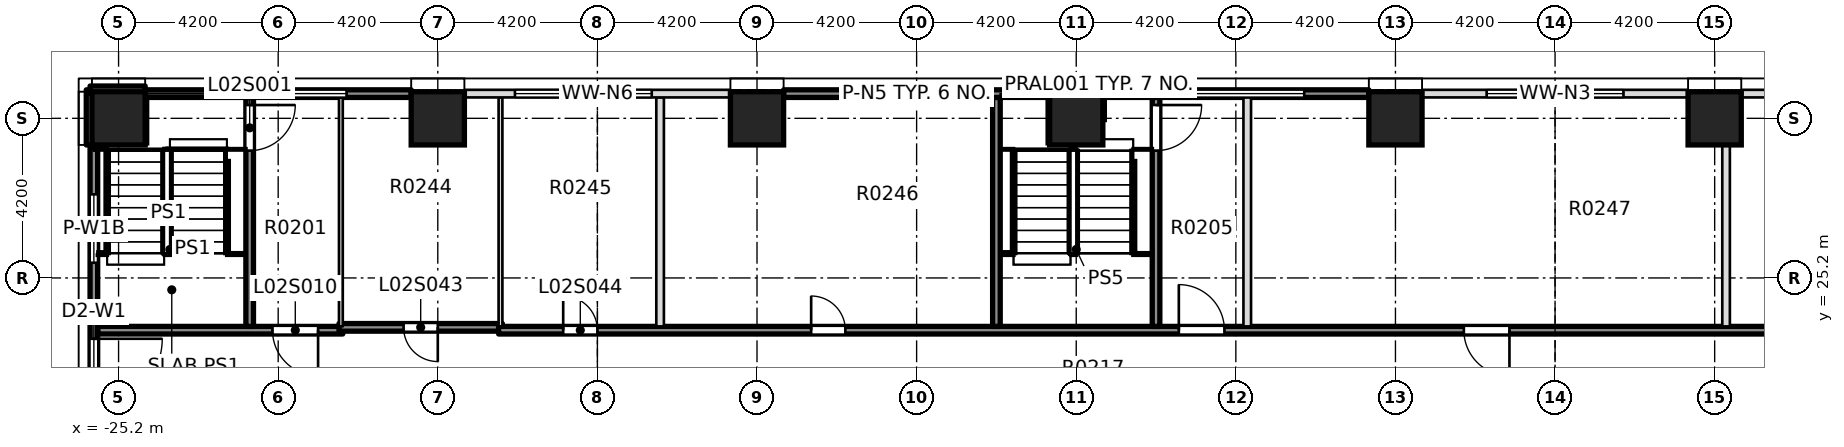
"""IFC4 building model, lengths in metres.
Left out: names, types, materials, properties, quantities, classifications, styles, units other than length and angle.
Written with IfcOpenShell. Run it as: python <this file> out.ifc"""

import sys

from ifc_helpers import new_model, si_unit, direction, frame, frame_2d, origin, origin_2d, place, context, subcontext, project, spatial, rectangle, extrude, element, fill, save


model = new_model("IFC4")
c1 = context("Model", 3, precision=1e-05, world=origin(), true_north=direction((0.0, 1.0)))
c2 = subcontext(c1, "Body", "Model", "MODEL_VIEW")
j1 = project(units=[si_unit("LENGTHUNIT", "METRE"), si_unit("PLANEANGLEUNIT", "RADIAN")], contexts=[c1])
p1 = place(None, origin())
s1 = spatial("IfcSite", under=j1, at=p1, CompositionType="ELEMENT")
p2 = place(p1, origin())
s2 = spatial("IfcBuilding", under=s1, at=p2, CompositionType="ELEMENT")
p3 = place(p2, frame((0.0, 0.0, 12.5)))
s3 = spatial("IfcBuildingStorey", under=s2, at=p3, CompositionType="ELEMENT", Elevation=12.5)
for number, where, z_axis, x_axis in (
    (1, (-25.2, 29.4, 0.0), (0.0, 0.0, 1.0), (1.0, 0.0, 0.0)),
    (2, (-16.8, 29.4, 0.0), (0.0, 0.0, 1.0), (1.0, 0.0, 0.0)),
    (3, (-8.4, 29.4, 0.0), (0.0, 0.0, 1.0), (1.0, 0.0, 0.0)),
    (4, (0.0, 29.4, 0.0), (0.0, 0.0, 1.0), (1.0, 0.0, 0.0)),
    (5, (8.4, 29.4, 0.0), (0.0, 0.0, 1.0), (1.0, 0.0, 0.0)),
    (6, (16.8, 29.4, 0.0), (0.0, 0.0, 1.0), (1.0, 0.0, 0.0)),
):
    element("IfcColumn", number, at=place(p3, frame(where, z_axis=z_axis, x_axis=x_axis)), inside=s3, PredefinedType="COLUMN", context=c2, shape_type="SweptSolid", body=[
        extrude(rectangle(XDim=1.4, YDim=1.4, at=origin_2d()), origin(), (0.0, 0.0, 1.0), 7.5),
    ])
p4 = place(p3, frame((-25.75, 23.825, 0.0), z_axis=(0.0, 0.0, 1.0), x_axis=(1.0, 0.0, 0.0)))
e7 = element("IfcWall", 7, at=p4, inside=s3, PredefinedType="SOLIDWALL", context=c2, shape_type="SweptSolid", body=[
    extrude(rectangle(XDim=6.45, YDim=0.2, at=frame_2d((3.225, 0.0))), origin(), (0.0, 0.0, 1.0), 7.1),
])
p5 = place(p4, frame((4.6, 0.0, 0.0)))
e8 = element("IfcOpeningElement", 8, at=p5, cuts=e7, PredefinedType="OPENING", context=c2, shape_type="SweptSolid", body=[
    extrude(rectangle(XDim=1.2, YDim=2.1, at=frame_2d((0.6, 1.05))), frame((0.0, 0.11, 0.0), z_axis=(0.0, -1.0, 0.0), x_axis=(1.0, 0.0, 0.0)), (0.0, 0.0, 1.0), 0.22),
])
p6 = place(p3, frame((-19.4, 23.9, 0.0), z_axis=(0.0, 0.0, 1.0), x_axis=(1.0, 0.0, 0.0)))
e9 = element("IfcWall", 9, at=p6, inside=s3, PredefinedType="SOLIDWALL", context=c2, shape_type="SweptSolid", body=[
    extrude(rectangle(XDim=4.3, YDim=0.2, at=frame_2d((2.15, 0.0))), origin(), (0.0, 0.0, 1.0), 7.1),
])
p7 = place(p6, frame((1.7, 0.0, 0.0)))
e10 = element("IfcOpeningElement", 10, at=p7, cuts=e9, PredefinedType="OPENING", context=c2, shape_type="SweptSolid", body=[
    extrude(rectangle(XDim=0.9, YDim=2.1, at=frame_2d((0.45, 1.05))), frame((0.0, 0.11, 0.0), z_axis=(0.0, -1.0, 0.0), x_axis=(1.0, 0.0, 0.0)), (0.0, 0.0, 1.0), 0.22),
])
p8 = place(p3, frame((-15.2, 23.825, 0.0), z_axis=(0.0, 0.0, 1.0), x_axis=(1.0, 0.0, 0.0)))
e11 = element("IfcWall", 11, at=p8, inside=s3, PredefinedType="SOLIDWALL", context=c2, shape_type="SweptSolid", body=[
    extrude(rectangle(XDim=51.45, YDim=0.2, at=frame_2d((25.725, 0.0))), origin(), (0.0, 0.0, 1.0), 7.1),
])
p9 = place(p8, frame((17.9, 0.0, 0.0)))
e12 = element("IfcOpeningElement", 12, at=p9, cuts=e11, PredefinedType="OPENING", context=c2, shape_type="SweptSolid", body=[
    extrude(rectangle(XDim=1.2, YDim=2.1, at=frame_2d((0.6, 1.05))), frame((0.0, 0.11, 0.0), z_axis=(0.0, -1.0, 0.0), x_axis=(1.0, 0.0, 0.0)), (0.0, 0.0, 1.0), 0.22),
])
p10 = place(p8, frame((1.7, 0.0, 0.0)))
e13 = element("IfcOpeningElement", 13, at=p10, cuts=e11, PredefinedType="OPENING", context=c2, shape_type="SweptSolid", body=[
    extrude(rectangle(XDim=0.9, YDim=2.1, at=frame_2d((0.45, 1.05))), frame((0.0, 0.11, 0.0), z_axis=(0.0, -1.0, 0.0), x_axis=(1.0, 0.0, 0.0)), (0.0, 0.0, 1.0), 0.22),
])
p11 = place(p8, frame((8.225, 0.0, 0.0)))
e14 = element("IfcOpeningElement", 14, at=p11, cuts=e11, PredefinedType="OPENING", context=c2, shape_type="SweptSolid", body=[
    extrude(rectangle(XDim=0.9, YDim=2.1, at=frame_2d((0.45, 1.05))), frame((0.0, 0.11, 0.0), z_axis=(0.0, -1.0, 0.0), x_axis=(1.0, 0.0, 0.0)), (0.0, 0.0, 1.0), 0.22),
])
p12 = place(p8, frame((25.4, 0.0, 0.0)))
e15 = element("IfcOpeningElement", 15, at=p12, cuts=e11, PredefinedType="OPENING", context=c2, shape_type="SweptSolid", body=[
    extrude(rectangle(XDim=1.2, YDim=2.1, at=frame_2d((0.6, 1.05))), frame((0.0, 0.11, 0.0), z_axis=(0.0, -1.0, 0.0), x_axis=(1.0, 0.0, 0.0)), (0.0, 0.0, 1.0), 0.22),
])
p13 = place(p8, frame((41.375, 0.0, 0.0)))
e16 = element("IfcOpeningElement", 16, at=p13, cuts=e11, PredefinedType="OPENING", context=c2, shape_type="SweptSolid", body=[
    extrude(rectangle(XDim=0.9, YDim=2.1, at=frame_2d((0.45, 1.05))), frame((0.0, 0.11, 0.0), z_axis=(0.0, -1.0, 0.0), x_axis=(1.0, 0.0, 0.0)), (0.0, 0.0, 1.0), 0.22),
])
p14 = place(p3, frame((-21.75, 23.925, 0.0), z_axis=(0.0, 0.0, 1.0), x_axis=(0.0, 1.0, 0.0)))
e17 = element("IfcWall", 17, at=p14, inside=s3, PredefinedType="SOLIDWALL", context=c2, shape_type="SweptSolid", body=[
    extrude(rectangle(XDim=6.025, YDim=0.2, at=frame_2d((3.012, 0.0))), origin(), (0.0, 0.0, 1.0), 7.1),
])
p15 = place(p14, frame((4.625, 0.0, 0.0)))
e18 = element("IfcOpeningElement", 18, at=p15, cuts=e17, PredefinedType="OPENING", context=c2, shape_type="SweptSolid", body=[
    extrude(rectangle(XDim=1.2, YDim=2.1, at=frame_2d((0.6, 1.05))), frame((0.0, 0.11, 0.0), z_axis=(0.0, -1.0, 0.0), x_axis=(1.0, 0.0, 0.0)), (0.0, 0.0, 1.0), 0.22),
])
for number, where, z_axis, x_axis in (
    (19, (-19.35, 23.925, 0.0), (0.0, 0.0, 1.0), (0.0, 1.0, 0.0)),
    (20, (-15.15, 23.925, 0.0), (0.0, 0.0, 1.0), (0.0, 1.0, 0.0)),
):
    element("IfcWall", number, at=place(p3, frame(where, z_axis=z_axis, x_axis=x_axis)), inside=s3, PredefinedType="PARTITIONING", context=c2, shape_type="SweptSolid", body=[
        extrude(rectangle(XDim=6.025, YDim=0.1, at=frame_2d((3.012, 0.0))), origin(), (0.0, 0.0, 1.0), 7.1),
    ])
p16 = place(p3, frame((-10.95, 23.925, 0.0), z_axis=(0.0, 0.0, 1.0), x_axis=(0.0, 1.0, 0.0)))
e21 = element("IfcWall", 21, at=p16, inside=s3, PredefinedType="PARTITIONING", context=c2, shape_type="SweptSolid", body=[
    extrude(rectangle(XDim=6.025, YDim=0.2, at=frame_2d((3.012, 0.0))), origin(), (0.0, 0.0, 1.0), 7.1),
])
p17 = place(p3, frame((-2.1, 23.925, 0.0), z_axis=(0.0, 0.0, 1.0), x_axis=(0.0, 1.0, 0.0)))
e22 = element("IfcWall", 22, at=p17, inside=s3, PredefinedType="SOLIDWALL", context=c2, shape_type="SweptSolid", body=[
    extrude(rectangle(XDim=6.025, YDim=0.2, at=frame_2d((3.012, 0.0))), origin(), (0.0, 0.0, 1.0), 7.1),
])
p18 = place(p3, frame((2.1, 23.925, 0.0), z_axis=(0.0, 0.0, 1.0), x_axis=(0.0, 1.0, 0.0)))
e23 = element("IfcWall", 23, at=p18, inside=s3, PredefinedType="SOLIDWALL", context=c2, shape_type="SweptSolid", body=[
    extrude(rectangle(XDim=6.025, YDim=0.2, at=frame_2d((3.012, 0.0))), origin(), (0.0, 0.0, 1.0), 7.1),
])
p19 = place(p18, frame((4.625, 0.0, 0.0)))
e24 = element("IfcOpeningElement", 24, at=p19, cuts=e23, PredefinedType="OPENING", context=c2, shape_type="SweptSolid", body=[
    extrude(rectangle(XDim=1.2, YDim=2.1, at=frame_2d((0.6, 1.05))), frame((0.0, 0.11, 0.0), z_axis=(0.0, -1.0, 0.0), x_axis=(1.0, 0.0, 0.0)), (0.0, 0.0, 1.0), 0.22),
])
for number, where, z_axis, x_axis in (
    (25, (4.5, 23.925, 0.0), (0.0, 0.0, 1.0), (0.0, 1.0, 0.0)),
    (26, (17.1, 23.925, 0.0), (0.0, 0.0, 1.0), (0.0, 1.0, 0.0)),
):
    element("IfcWall", number, at=place(p3, frame(where, z_axis=z_axis, x_axis=x_axis)), inside=s3, PredefinedType="PARTITIONING", context=c2, shape_type="SweptSolid", body=[
        extrude(rectangle(XDim=6.025, YDim=0.2, at=frame_2d((3.012, 0.0))), origin(), (0.0, 0.0, 1.0), 7.1),
    ])
p20 = place(p3, frame((24.5, 30.05, 0.0), z_axis=(0.0, 0.0, 1.0), x_axis=(-1.0, 0.0, 0.0)))
e27 = element("IfcWall", 27, at=p20, inside=s3, PredefinedType="STANDARD", context=c2, shape_type="SweptSolid", body=[
    extrude(rectangle(XDim=7.0, YDim=0.2, at=frame_2d((3.5, 0.0))), origin(), (0.0, 0.0, 1.0), 7.1),
])
p21 = place(p20, frame((1.7, 0.0, 0.9)))
e28 = element("IfcOpeningElement", 28, at=p21, cuts=e27, PredefinedType="OPENING", context=c2, shape_type="SweptSolid", body=[
    extrude(rectangle(XDim=3.6, YDim=4.2, at=frame_2d((1.8, 2.1))), frame((0.0, 0.11, 0.0), z_axis=(0.0, -1.0, 0.0), x_axis=(1.0, 0.0, 0.0)), (0.0, 0.0, 1.0), 0.22),
])
p22 = place(p3, frame((16.1, 30.05, 0.0), z_axis=(0.0, 0.0, 1.0), x_axis=(-1.0, 0.0, 0.0)))
e29 = element("IfcWall", 29, at=p22, inside=s3, PredefinedType="STANDARD", context=c2, shape_type="SweptSolid", body=[
    extrude(rectangle(XDim=7.0, YDim=0.2, at=frame_2d((3.5, 0.0))), origin(), (0.0, 0.0, 1.0), 7.1),
])
p23 = place(p22, frame((1.7, 0.0, 0.9)))
e30 = element("IfcOpeningElement", 30, at=p23, cuts=e29, PredefinedType="OPENING", context=c2, shape_type="SweptSolid", body=[
    extrude(rectangle(XDim=3.6, YDim=4.2, at=frame_2d((1.8, 2.1))), frame((0.0, 0.11, 0.0), z_axis=(0.0, -1.0, 0.0), x_axis=(1.0, 0.0, 0.0)), (0.0, 0.0, 1.0), 0.22),
])
p24 = place(p3, frame((0.7, 30.05, 0.0), z_axis=(0.0, 0.0, 1.0), x_axis=(1.0, 0.0, 0.0)))
e31 = element("IfcWall", 31, at=p24, inside=s3, PredefinedType="SOLIDWALL", context=c2, shape_type="SweptSolid", body=[
    extrude(rectangle(XDim=7.0, YDim=0.2, at=frame_2d((3.5, 0.0))), origin(), (0.0, 0.0, 1.0), 7.1),
])
p25 = place(p24, frame((1.7, 0.0, 0.9)))
e32 = element("IfcOpeningElement", 32, at=p25, cuts=e31, PredefinedType="OPENING", context=c2, shape_type="SweptSolid", body=[
    extrude(rectangle(XDim=3.6, YDim=4.2, at=frame_2d((1.8, 2.1))), frame((0.0, 0.11, 0.0), z_axis=(0.0, -1.0, 0.0), x_axis=(1.0, 0.0, 0.0)), (0.0, 0.0, 1.0), 0.22),
])
p26 = place(p3, frame((-7.7, 30.05, 0.0), z_axis=(0.0, 0.0, 1.0), x_axis=(1.0, 0.0, 0.0)))
e33 = element("IfcWall", 33, at=p26, inside=s3, PredefinedType="SOLIDWALL", context=c2, shape_type="SweptSolid", body=[
    extrude(rectangle(XDim=7.0, YDim=0.2, at=frame_2d((3.5, 0.0))), origin(), (0.0, 0.0, 1.0), 7.1),
])
p27 = place(p26, frame((1.7, 0.0, 0.9)))
e34 = element("IfcOpeningElement", 34, at=p27, cuts=e33, PredefinedType="OPENING", context=c2, shape_type="SweptSolid", body=[
    extrude(rectangle(XDim=3.6, YDim=4.2, at=frame_2d((1.8, 2.1))), frame((0.0, 0.11, 0.0), z_axis=(0.0, -1.0, 0.0), x_axis=(1.0, 0.0, 0.0)), (0.0, 0.0, 1.0), 0.22),
])
p28 = place(p3, frame((-9.1, 30.05, 0.0), z_axis=(0.0, 0.0, 1.0), x_axis=(-1.0, 0.0, 0.0)))
e35 = element("IfcWall", 35, at=p28, inside=s3, PredefinedType="STANDARD", context=c2, shape_type="SweptSolid", body=[
    extrude(rectangle(XDim=7.0, YDim=0.2, at=frame_2d((3.5, 0.0))), origin(), (0.0, 0.0, 1.0), 7.1),
])
p29 = place(p28, frame((2.07, 0.0, 0.9)))
e36 = element("IfcOpeningElement", 36, at=p29, cuts=e35, PredefinedType="OPENING", context=c2, shape_type="SweptSolid", body=[
    extrude(rectangle(XDim=3.6, YDim=4.2, at=frame_2d((1.8, 2.1))), frame((0.0, 0.11, 0.0), z_axis=(0.0, -1.0, 0.0), x_axis=(1.0, 0.0, 0.0)), (0.0, 0.0, 1.0), 0.22),
])
p30 = place(p3, frame((-24.5, 30.05, 0.0), z_axis=(0.0, 0.0, 1.0), x_axis=(1.0, 0.0, 0.0)))
e37 = element("IfcWall", 37, at=p30, inside=s3, PredefinedType="SOLIDWALL", context=c2, shape_type="SweptSolid", body=[
    extrude(rectangle(XDim=7.0, YDim=0.2, at=frame_2d((3.5, 0.0))), origin(), (0.0, 0.0, 1.0), 7.1),
])
p31 = place(p30, frame((1.7, 0.0, 0.9)))
e38 = element("IfcOpeningElement", 38, at=p31, cuts=e37, PredefinedType="OPENING", context=c2, shape_type="SweptSolid", body=[
    extrude(rectangle(XDim=3.6, YDim=4.2, at=frame_2d((1.8, 2.1))), frame((0.0, 0.11, 0.0), z_axis=(0.0, -1.0, 0.0), x_axis=(1.0, 0.0, 0.0)), (0.0, 0.0, 1.0), 0.22),
])
p32 = place(p3, frame((-25.85, 21.7, 0.0), z_axis=(0.0, 0.0, 1.0), x_axis=(0.0, 1.0, 0.0)))
e39 = element("IfcWall", 39, at=p32, inside=s3, PredefinedType="SOLIDWALL", context=c2, shape_type="SweptSolid", body=[
    extrude(rectangle(XDim=7.0, YDim=0.2, at=frame_2d((3.5, 0.0))), origin(), (0.0, 0.0, 1.0), 7.1),
])
p33 = place(p32, frame((0.1, 0.0, 0.0)))
e40 = element("IfcOpeningElement", 40, at=p33, cuts=e39, PredefinedType="OPENING", context=c2, shape_type="SweptSolid", body=[
    extrude(rectangle(XDim=1.8, YDim=2.4, at=frame_2d((0.9, 1.2))), frame((0.0, 0.11, 0.0), z_axis=(0.0, -1.0, 0.0), x_axis=(1.0, 0.0, 0.0)), (0.0, 0.0, 1.0), 0.22),
])
p34 = place(p32, frame((3.9, 0.0, 0.9)))
e41 = element("IfcOpeningElement", 41, at=p34, cuts=e39, PredefinedType="OPENING", context=c2, shape_type="SweptSolid", body=[
    extrude(rectangle(XDim=1.8, YDim=4.2, at=frame_2d((0.9, 2.1))), frame((0.0, 0.11, 0.0), z_axis=(0.0, -1.0, 0.0), x_axis=(1.0, 0.0, 0.0)), (0.0, 0.0, 1.0), 0.22),
])
for number, where, z_axis, x_axis in (
    (42, (-25.95, 28.7, 0.0), (0.0, 0.0, 1.0), (0.0, 1.0, 0.0)),
    (43, (-25.95, 30.15, 0.0), (0.0, 0.0, 1.0), (1.0, 0.0, 0.0)),
):
    element("IfcWall", number, at=place(p3, frame(where, z_axis=z_axis, x_axis=x_axis)), inside=s3, PredefinedType="SOLIDWALL", context=c2, shape_type="SweptSolid", body=[
        extrude(rectangle(XDim=1.45, YDim=0.2, at=frame_2d((0.725, 0.0))), origin(), (0.0, 0.0, 1.0), 7.1),
    ])
p35 = place(p3, frame((-0.7, 30.15, 0.0), z_axis=(0.0, 0.0, 1.0), x_axis=(1.0, 0.0, 0.0)))
e44 = element("IfcWall", 44, at=p35, inside=s3, PredefinedType="SOLIDWALL", context=c2, shape_type="SweptSolid", body=[
    extrude(rectangle(XDim=1.4, YDim=0.2, at=frame_2d((0.7, 0.0))), origin(), (0.0, 0.0, 1.0), 7.1),
])
p36 = place(p15, origin())
e45 = element("IfcDoor", 45, at=p36, inside=s3, OperationType="DOUBLE_DOOR_SINGLE_SWING", PredefinedType="DOOR", context=c2, shape_type="SweptSolid", body=[
    extrude(rectangle(XDim=1.2, YDim=2.1, at=frame_2d((0.6, 1.05))), frame((0.0, 0.025, 0.0), z_axis=(0.0, -1.0, 0.0), x_axis=(1.0, 0.0, 0.0)), (0.0, 0.0, 1.0), 0.05),
])
fill(e18, e45)
p37 = place(p19, origin())
e46 = element("IfcDoor", 46, at=p37, inside=s3, OperationType="DOUBLE_DOOR_SINGLE_SWING", PredefinedType="DOOR", context=c2, shape_type="SweptSolid", body=[
    extrude(rectangle(XDim=1.2, YDim=2.1, at=frame_2d((0.6, 1.05))), frame((0.0, 0.025, 0.0), z_axis=(0.0, -1.0, 0.0), x_axis=(1.0, 0.0, 0.0)), (0.0, 0.0, 1.0), 0.05),
])
fill(e24, e46)
p38 = place(p5, origin())
e47 = element("IfcDoor", 47, at=p38, inside=s3, OperationType="SINGLE_SWING_LEFT", PredefinedType="DOOR", context=c2, shape_type="SweptSolid", body=[
    extrude(rectangle(XDim=1.2, YDim=2.1, at=frame_2d((0.6, 1.05))), frame((0.0, 0.025, 0.0), z_axis=(0.0, -1.0, 0.0), x_axis=(1.0, 0.0, 0.0)), (0.0, 0.0, 1.0), 0.05),
])
fill(e8, e47)
p39 = place(p9, origin())
e48 = element("IfcDoor", 48, at=p39, inside=s3, OperationType="SINGLE_SWING_RIGHT", PredefinedType="DOOR", context=c2, shape_type="SweptSolid", body=[
    extrude(rectangle(XDim=1.2, YDim=2.1, at=frame_2d((0.6, 1.05))), frame((0.0, 0.025, 0.0), z_axis=(0.0, -1.0, 0.0), x_axis=(1.0, 0.0, 0.0)), (0.0, 0.0, 1.0), 0.05),
])
fill(e12, e48)
p40 = place(p7, origin())
e49 = element("IfcDoor", 49, at=p40, inside=s3, OperationType="SINGLE_SWING_RIGHT", PredefinedType="DOOR", context=c2, shape_type="SweptSolid", body=[
    extrude(rectangle(XDim=0.9, YDim=2.1, at=frame_2d((0.45, 1.05))), frame((0.0, 0.025, 0.0), z_axis=(0.0, -1.0, 0.0), x_axis=(1.0, 0.0, 0.0)), (0.0, 0.0, 1.0), 0.05),
])
fill(e10, e49)
p41 = place(p10, origin())
e50 = element("IfcDoor", 50, at=p41, inside=s3, OperationType="SINGLE_SWING_RIGHT", PredefinedType="DOOR", context=c2, shape_type="SweptSolid", body=[
    extrude(rectangle(XDim=0.9, YDim=2.1, at=frame_2d((0.45, 1.05))), frame((0.0, 0.025, 0.0), z_axis=(0.0, -1.0, 0.0), x_axis=(1.0, 0.0, 0.0)), (0.0, 0.0, 1.0), 0.05),
])
fill(e13, e50)
p42 = place(p11, origin())
e51 = element("IfcDoor", 51, at=p42, inside=s3, OperationType="SINGLE_SWING_RIGHT", PredefinedType="DOOR", context=c2, shape_type="SweptSolid", body=[
    extrude(rectangle(XDim=0.9, YDim=2.1, at=frame_2d((0.45, 1.05))), frame((0.0, 0.025, 0.0), z_axis=(0.0, -1.0, 0.0), x_axis=(1.0, 0.0, 0.0)), (0.0, 0.0, 1.0), 0.05),
])
fill(e14, e51)
p43 = place(p12, origin())
e52 = element("IfcDoor", 52, at=p43, inside=s3, OperationType="SINGLE_SWING_LEFT", PredefinedType="DOOR", context=c2, shape_type="SweptSolid", body=[
    extrude(rectangle(XDim=1.2, YDim=2.1, at=frame_2d((0.6, 1.05))), frame((0.0, 0.025, 0.0), z_axis=(0.0, -1.0, 0.0), x_axis=(1.0, 0.0, 0.0)), (0.0, 0.0, 1.0), 0.05),
])
fill(e15, e52)
p44 = place(p23, origin())
e53 = element("IfcWindow", 53, at=p44, inside=s3, PartitioningType="SINGLE_PANEL", PredefinedType="WINDOW", context=c2, shape_type="SweptSolid", body=[
    extrude(rectangle(XDim=3.6, YDim=4.2, at=frame_2d((1.8, 2.1))), frame((0.0, 0.03, 0.0), z_axis=(0.0, -1.0, 0.0), x_axis=(1.0, 0.0, 0.0)), (0.0, 0.0, 1.0), 0.06),
])
fill(e30, e53)
p45 = place(p25, origin())
e54 = element("IfcWindow", 54, at=p45, inside=s3, PartitioningType="SINGLE_PANEL", PredefinedType="WINDOW", context=c2, shape_type="SweptSolid", body=[
    extrude(rectangle(XDim=3.6, YDim=4.2, at=frame_2d((1.8, 2.1))), frame((0.0, 0.03, 0.0), z_axis=(0.0, -1.0, 0.0), x_axis=(1.0, 0.0, 0.0)), (0.0, 0.0, 1.0), 0.06),
])
fill(e32, e54)
p46 = place(p27, origin())
e55 = element("IfcWindow", 55, at=p46, inside=s3, PartitioningType="SINGLE_PANEL", PredefinedType="WINDOW", context=c2, shape_type="SweptSolid", body=[
    extrude(rectangle(XDim=3.6, YDim=4.2, at=frame_2d((1.8, 2.1))), frame((0.0, 0.03, 0.0), z_axis=(0.0, -1.0, 0.0), x_axis=(1.0, 0.0, 0.0)), (0.0, 0.0, 1.0), 0.06),
])
fill(e34, e55)
p47 = place(p29, origin())
e56 = element("IfcWindow", 56, at=p47, inside=s3, PartitioningType="SINGLE_PANEL", PredefinedType="WINDOW", context=c2, shape_type="SweptSolid", body=[
    extrude(rectangle(XDim=3.6, YDim=4.2, at=frame_2d((1.8, 2.1))), frame((0.0, 0.03, 0.0), z_axis=(0.0, -1.0, 0.0), x_axis=(1.0, 0.0, 0.0)), (0.0, 0.0, 1.0), 0.06),
])
fill(e36, e56)
p48 = place(p31, origin())
e57 = element("IfcWindow", 57, at=p48, inside=s3, PartitioningType="SINGLE_PANEL", PredefinedType="WINDOW", context=c2, shape_type="SweptSolid", body=[
    extrude(rectangle(XDim=3.6, YDim=4.2, at=frame_2d((1.8, 2.1))), frame((0.0, 0.03, 0.0), z_axis=(0.0, -1.0, 0.0), x_axis=(1.0, 0.0, 0.0)), (0.0, 0.0, 1.0), 0.06),
])
fill(e38, e57)
p49 = place(p33, origin())
e58 = element("IfcDoor", 58, at=p49, inside=s3, OperationType="SINGLE_SWING_LEFT", PredefinedType="DOOR", context=c2, shape_type="SweptSolid", body=[
    extrude(rectangle(XDim=1.8, YDim=2.4, at=frame_2d((0.9, 1.2))), frame((0.0, 0.025, 0.0), z_axis=(0.0, -1.0, 0.0), x_axis=(1.0, 0.0, 0.0)), (0.0, 0.0, 1.0), 0.05),
])
fill(e40, e58)
p50 = place(p34, origin())
e59 = element("IfcWindow", 59, at=p50, inside=s3, PartitioningType="SINGLE_PANEL", PredefinedType="WINDOW", context=c2, shape_type="SweptSolid", body=[
    extrude(rectangle(XDim=1.8, YDim=4.2, at=frame_2d((0.9, 2.1))), frame((0.0, 0.03, 0.0), z_axis=(0.0, -1.0, 0.0), x_axis=(1.0, 0.0, 0.0)), (0.0, 0.0, 1.0), 0.06),
])
fill(e41, e59)
save(model, sys.argv[1])
